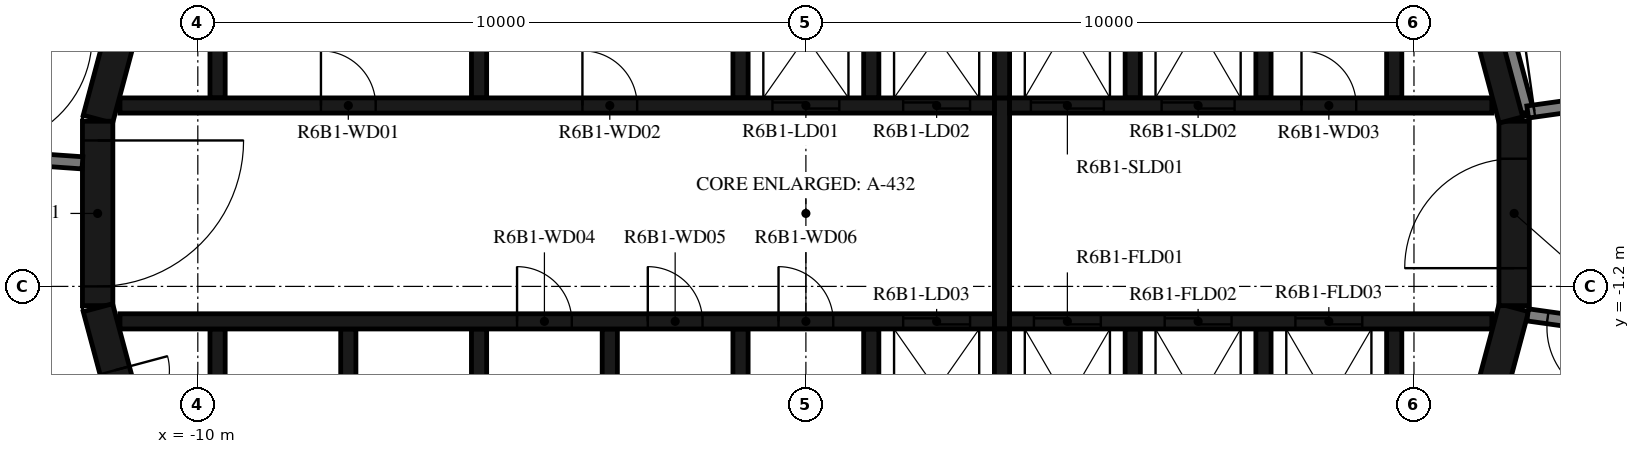
"""IFC4 building model, lengths in metres.
Left out: names, types, materials, properties, quantities, classifications, styles, units other than length and angle.
Written with IfcOpenShell. Run it as: python <this file> out.ifc"""

import sys

from ifc_helpers import new_model, si_unit, direction, frame, frame_2d, origin, place, context, subcontext, project, spatial, polyline, rectangle, outline, extrude, element, fill, save


model = new_model("IFC4")
c1 = context("Model", 3, precision=1e-05, world=origin(), true_north=direction((0.0, 1.0)))
c2 = subcontext(c1, "Body", "Model", "MODEL_VIEW")
j1 = project(units=[si_unit("LENGTHUNIT", "METRE"), si_unit("PLANEANGLEUNIT", "RADIAN")], contexts=[c1])
p1 = place(None, origin())
s1 = spatial("IfcSite", under=j1, at=p1, CompositionType="ELEMENT")
p2 = place(p1, origin())
s2 = spatial("IfcBuilding", under=s1, at=p2, CompositionType="ELEMENT")
p3 = place(p2, frame((0.0, 0.0, 237.2)))
s3 = spatial("IfcBuildingStorey", under=s2, at=p3, CompositionType="ELEMENT", Elevation=237.2)
p4 = place(p3, frame((10.858, -4.479, 0.0), z_axis=(0.0, 0.0, 1.0), x_axis=(0.258734743916, 0.965948410781, 0.0)))
e1 = element("IfcWall", 1, at=p4, inside=s3, PredefinedType="SHEAR", context=c2, shape_type="SweptSolid", body=[
    extrude(rectangle(XDim=3.033, YDim=0.5, at=frame_2d((1.516, 0.0))), origin(), (0.0, 0.0, 1.0), 3.12),
])
p5 = place(p3, frame((11.647, -1.516, 0.0), z_axis=(0.0, 0.0, 1.0), x_axis=(0.0, 1.0, 0.0)))
e2 = element("IfcWall", 2, at=p5, inside=s3, PredefinedType="SHEAR", context=c2, shape_type="SweptSolid", body=[
    extrude(rectangle(XDim=3.033, YDim=0.5, at=frame_2d((1.516, 0.0))), origin(), (0.0, 0.0, 1.0), 3.12),
])
p6 = place(p5, frame((0.616, 0.0, 0.0)))
e3 = element("IfcOpeningElement", 3, at=p6, cuts=e2, PredefinedType="OPENING", context=c2, shape_type="SweptSolid", body=[
    extrude(rectangle(XDim=1.8, YDim=2.1, at=frame_2d((0.9, 1.05))), frame((0.0, 0.26, 0.0), z_axis=(0.0, -1.0, 0.0), x_axis=(1.0, 0.0, 0.0)), (0.0, 0.0, 1.0), 0.52),
])
for number, where, z_axis, x_axis in (
    (4, (11.643, 1.55, 0.0), (0.0, 0.0, 1.0), (-0.259, 0.966, 0.0)),
    (5, (-10.858, 4.479, 0.0), (0.0, 0.0, 1.0), (-0.259, -0.966, 0.0)),
):
    element("IfcWall", number, at=place(p3, frame(where, z_axis=z_axis, x_axis=x_axis)), inside=s3, PredefinedType="SHEAR", context=c2, shape_type="SweptSolid", body=[
        extrude(rectangle(XDim=3.033, YDim=0.5, at=frame_2d((1.516, 0.0))), origin(), (0.0, 0.0, 1.0), 3.12),
    ])
p7 = place(p3, frame((-11.647, 1.516, 0.0), z_axis=(0.0, 0.0, 1.0), x_axis=(0.0, -1.0, 0.0)))
e6 = element("IfcWall", 6, at=p7, inside=s3, PredefinedType="SHEAR", context=c2, shape_type="SweptSolid", body=[
    extrude(rectangle(XDim=3.033, YDim=0.5, at=frame_2d((1.516, 0.0))), origin(), (0.0, 0.0, 1.0), 3.12),
])
p8 = place(p7, frame((0.316, 0.0, 0.0)))
e7 = element("IfcOpeningElement", 7, at=p8, cuts=e6, PredefinedType="OPENING", context=c2, shape_type="SweptSolid", body=[
    extrude(rectangle(XDim=2.4, YDim=2.1, at=frame_2d((1.2, 1.05))), frame((0.0, 0.26, 0.0), z_axis=(0.0, -1.0, 0.0), x_axis=(1.0, 0.0, 0.0)), (0.0, 0.0, 1.0), 0.52),
])
p9 = place(p3, frame((-11.643, -1.55, 0.0), z_axis=(0.0, 0.0, 1.0), x_axis=(0.258734743916, -0.965948410781, 0.0)))
e8 = element("IfcWall", 8, at=p9, inside=s3, PredefinedType="SHEAR", context=c2, shape_type="SweptSolid", body=[
    extrude(rectangle(XDim=3.033, YDim=0.5, at=frame_2d((1.516, 0.0))), origin(), (0.0, 0.0, 1.0), 3.12),
])
p10 = place(p9, frame((1.066, 0.0, 0.0)))
e9 = element("IfcOpeningElement", 9, at=p10, cuts=e8, PredefinedType="OPENING", context=c2, shape_type="SweptSolid", body=[
    extrude(rectangle(XDim=0.9, YDim=2.1, at=frame_2d((0.45, 1.05))), frame((0.0, 0.26, 0.0), z_axis=(0.0, -1.0, 0.0), x_axis=(1.0, 0.0, 0.0)), (0.0, 0.0, 1.0), 0.52),
])
p11 = place(p3, origin())
e10 = element("IfcWall", 10, at=p11, inside=s3, PredefinedType="SHEAR", context=c2, shape_type="SweptSolid", body=[
    extrude(outline(polyline([(-9.55, 4.8), (-5.5, 4.8), (-5.5, 1.9), (-5.25, 1.9), (-5.25, 4.8), (-1.2, 4.8), (-1.2, 1.9), (-0.95, 1.9), (-0.95, 4.8), (0.95, 4.8), (0.95, 1.9), (1.2, 1.9), (1.2, 4.8), (3.1, 4.8), (3.1, 1.9), (3.35, 1.9), (3.35, 4.8), (5.25, 4.8), (5.25, 1.9), (5.5, 1.9), (5.5, 4.8), (7.4, 4.8), (7.4, 1.9), (7.65, 1.9), (7.65, 4.8), (9.55, 4.8), (9.55, 1.9), (9.8, 1.9), (9.8, 4.8), (9.8, 5.05), (-9.8, 5.05), (-9.8, 4.8), (-9.8, 1.9), (-9.55, 1.9), (-9.55, 4.8)])), origin(), (0.0, 0.0, 1.0), 3.12),
])
p12 = place(p3, origin())
e11 = element("IfcWall", 11, at=p12, inside=s3, PredefinedType="SHEAR", context=c2, shape_type="SweptSolid", body=[
    extrude(outline(polyline([(9.8, -5.05), (9.8, -4.8), (9.8, -1.9), (9.55, -1.9), (9.55, -4.8), (7.65, -4.8), (7.65, -1.9), (7.4, -1.9), (7.4, -4.8), (5.5, -4.8), (5.5, -1.9), (5.25, -1.9), (5.25, -4.8), (3.35, -4.8), (3.35, -1.9), (3.1, -1.9), (3.1, -4.8), (1.2, -4.8), (1.2, -1.9), (0.95, -1.9), (0.95, -4.8), (-0.95, -4.8), (-0.95, -1.9), (-1.2, -1.9), (-1.2, -4.8), (-3.1, -4.8), (-3.1, -1.9), (-3.35, -1.9), (-3.35, -4.8), (-5.25, -4.8), (-5.25, -1.9), (-5.5, -1.9), (-5.5, -4.8), (-7.4, -4.8), (-7.4, -1.9), (-7.65, -1.9), (-7.65, -4.8), (-9.55, -4.8), (-9.55, -1.9), (-9.8, -1.9), (-9.8, -4.8), (-9.8, -5.05), (9.8, -5.05)])), origin(), (0.0, 0.0, 1.0), 3.12),
])
p13 = place(p3, frame((-11.28, 1.775, 0.0), z_axis=(0.0, 0.0, 1.0), x_axis=(1.0, 0.0, 0.0)))
e12 = element("IfcWall", 12, at=p13, inside=s3, PredefinedType="SHEAR", context=c2, shape_type="SweptSolid", body=[
    extrude(rectangle(XDim=14.38, YDim=0.25, at=frame_2d((7.19, 0.0))), origin(), (0.0, 0.0, 1.0), 3.12),
])
p14 = place(p13, frame((10.73, 0.0, 0.0)))
e13 = element("IfcOpeningElement", 13, at=p14, cuts=e12, PredefinedType="OPENING", context=c2, shape_type="SweptSolid", body=[
    extrude(rectangle(XDim=1.1, YDim=2.1, at=frame_2d((0.55, 1.05))), frame((0.0, 0.135, 0.0), z_axis=(0.0, -1.0, 0.0), x_axis=(1.0, 0.0, 0.0)), (0.0, 0.0, 1.0), 0.27),
])
p15 = place(p13, frame((12.88, 0.0, 0.0)))
e14 = element("IfcOpeningElement", 14, at=p15, cuts=e12, PredefinedType="OPENING", context=c2, shape_type="SweptSolid", body=[
    extrude(rectangle(XDim=1.1, YDim=2.1, at=frame_2d((0.55, 1.05))), frame((0.0, 0.135, 0.0), z_axis=(0.0, -1.0, 0.0), x_axis=(1.0, 0.0, 0.0)), (0.0, 0.0, 1.0), 0.27),
])
p16 = place(p13, frame((3.305, 0.0, 0.0)))
e15 = element("IfcOpeningElement", 15, at=p16, cuts=e12, PredefinedType="OPENING", context=c2, shape_type="SweptSolid", body=[
    extrude(rectangle(XDim=0.9, YDim=2.1, at=frame_2d((0.45, 1.05))), frame((0.0, 0.135, 0.0), z_axis=(0.0, -1.0, 0.0), x_axis=(1.0, 0.0, 0.0)), (0.0, 0.0, 1.0), 0.27),
])
p17 = place(p13, frame((7.605, 0.0, 0.0)))
e16 = element("IfcOpeningElement", 16, at=p17, cuts=e12, PredefinedType="OPENING", context=c2, shape_type="SweptSolid", body=[
    extrude(rectangle(XDim=0.9, YDim=2.1, at=frame_2d((0.45, 1.05))), frame((0.0, 0.135, 0.0), z_axis=(0.0, -1.0, 0.0), x_axis=(1.0, 0.0, 0.0)), (0.0, 0.0, 1.0), 0.27),
])
p18 = place(p3, frame((3.35, 1.775, 0.0), z_axis=(0.0, 0.0, 1.0), x_axis=(1.0, 0.0, 0.0)))
e17 = element("IfcWall", 17, at=p18, inside=s3, PredefinedType="SHEAR", context=c2, shape_type="SweptSolid", body=[
    extrude(rectangle(XDim=7.93, YDim=0.25, at=frame_2d((3.965, 0.0))), origin(), (0.0, 0.0, 1.0), 3.12),
])
p19 = place(p18, frame((0.35, 0.0, 0.0)))
e18 = element("IfcOpeningElement", 18, at=p19, cuts=e17, PredefinedType="OPENING", context=c2, shape_type="SweptSolid", body=[
    extrude(rectangle(XDim=1.2, YDim=2.4, at=frame_2d((0.6, 1.2))), frame((0.0, 0.135, 0.0), z_axis=(0.0, -1.0, 0.0), x_axis=(1.0, 0.0, 0.0)), (0.0, 0.0, 1.0), 0.27),
])
p20 = place(p18, frame((2.5, 0.0, 0.0)))
e19 = element("IfcOpeningElement", 19, at=p20, cuts=e17, PredefinedType="OPENING", context=c2, shape_type="SweptSolid", body=[
    extrude(rectangle(XDim=1.2, YDim=2.4, at=frame_2d((0.6, 1.2))), frame((0.0, 0.135, 0.0), z_axis=(0.0, -1.0, 0.0), x_axis=(1.0, 0.0, 0.0)), (0.0, 0.0, 1.0), 0.27),
])
p21 = place(p18, frame((4.8, 0.0, 0.0)))
e20 = element("IfcOpeningElement", 20, at=p21, cuts=e17, PredefinedType="OPENING", context=c2, shape_type="SweptSolid", body=[
    extrude(rectangle(XDim=0.9, YDim=2.1, at=frame_2d((0.45, 1.05))), frame((0.0, 0.135, 0.0), z_axis=(0.0, -1.0, 0.0), x_axis=(1.0, 0.0, 0.0)), (0.0, 0.0, 1.0), 0.27),
])
p22 = place(p3, frame((-11.28, -1.775, 0.0), z_axis=(0.0, 0.0, 1.0), x_axis=(1.0, 0.0, 0.0)))
e21 = element("IfcWall", 21, at=p22, inside=s3, PredefinedType="SHEAR", context=c2, shape_type="SweptSolid", body=[
    extrude(rectangle(XDim=14.38, YDim=0.25, at=frame_2d((7.19, 0.0))), origin(), (0.0, 0.0, 1.0), 3.12),
])
p23 = place(p22, frame((12.88, 0.0, 0.0)))
e22 = element("IfcOpeningElement", 22, at=p23, cuts=e21, PredefinedType="OPENING", context=c2, shape_type="SweptSolid", body=[
    extrude(rectangle(XDim=1.1, YDim=2.1, at=frame_2d((0.55, 1.05))), frame((0.0, 0.135, 0.0), z_axis=(0.0, -1.0, 0.0), x_axis=(1.0, 0.0, 0.0)), (0.0, 0.0, 1.0), 0.27),
])
p24 = place(p22, frame((6.53, 0.0, 0.0)))
e23 = element("IfcOpeningElement", 23, at=p24, cuts=e21, PredefinedType="OPENING", context=c2, shape_type="SweptSolid", body=[
    extrude(rectangle(XDim=0.9, YDim=2.1, at=frame_2d((0.45, 1.05))), frame((0.0, 0.135, 0.0), z_axis=(0.0, -1.0, 0.0), x_axis=(1.0, 0.0, 0.0)), (0.0, 0.0, 1.0), 0.27),
])
p25 = place(p22, frame((8.68, 0.0, 0.0)))
e24 = element("IfcOpeningElement", 24, at=p25, cuts=e21, PredefinedType="OPENING", context=c2, shape_type="SweptSolid", body=[
    extrude(rectangle(XDim=0.9, YDim=2.1, at=frame_2d((0.45, 1.05))), frame((0.0, 0.135, 0.0), z_axis=(0.0, -1.0, 0.0), x_axis=(1.0, 0.0, 0.0)), (0.0, 0.0, 1.0), 0.27),
])
p26 = place(p22, frame((10.83, 0.0, 0.0)))
e25 = element("IfcOpeningElement", 25, at=p26, cuts=e21, PredefinedType="OPENING", context=c2, shape_type="SweptSolid", body=[
    extrude(rectangle(XDim=0.9, YDim=2.1, at=frame_2d((0.45, 1.05))), frame((0.0, 0.135, 0.0), z_axis=(0.0, -1.0, 0.0), x_axis=(1.0, 0.0, 0.0)), (0.0, 0.0, 1.0), 0.27),
])
p27 = place(p3, frame((3.35, -1.775, 0.0), z_axis=(0.0, 0.0, 1.0), x_axis=(1.0, 0.0, 0.0)))
e26 = element("IfcWall", 26, at=p27, inside=s3, PredefinedType="SHEAR", context=c2, shape_type="SweptSolid", body=[
    extrude(rectangle(XDim=7.93, YDim=0.25, at=frame_2d((3.965, 0.0))), origin(), (0.0, 0.0, 1.0), 3.12),
])
p28 = place(p27, frame((0.4, 0.0, 0.0)))
e27 = element("IfcOpeningElement", 27, at=p28, cuts=e26, PredefinedType="OPENING", context=c2, shape_type="SweptSolid", body=[
    extrude(rectangle(XDim=1.1, YDim=2.4, at=frame_2d((0.55, 1.2))), frame((0.0, 0.135, 0.0), z_axis=(0.0, -1.0, 0.0), x_axis=(1.0, 0.0, 0.0)), (0.0, 0.0, 1.0), 0.27),
])
p29 = place(p27, frame((2.55, 0.0, 0.0)))
e28 = element("IfcOpeningElement", 28, at=p29, cuts=e26, PredefinedType="OPENING", context=c2, shape_type="SweptSolid", body=[
    extrude(rectangle(XDim=1.1, YDim=2.4, at=frame_2d((0.55, 1.2))), frame((0.0, 0.135, 0.0), z_axis=(0.0, -1.0, 0.0), x_axis=(1.0, 0.0, 0.0)), (0.0, 0.0, 1.0), 0.27),
])
p30 = place(p27, frame((4.7, 0.0, 0.0)))
e29 = element("IfcOpeningElement", 29, at=p30, cuts=e26, PredefinedType="OPENING", context=c2, shape_type="SweptSolid", body=[
    extrude(rectangle(XDim=1.1, YDim=2.4, at=frame_2d((0.55, 1.2))), frame((0.0, 0.135, 0.0), z_axis=(0.0, -1.0, 0.0), x_axis=(1.0, 0.0, 0.0)), (0.0, 0.0, 1.0), 0.27),
])
p31 = place(p3, frame((3.225, -1.9, 0.0), z_axis=(0.0, 0.0, 1.0), x_axis=(0.0, 1.0, 0.0)))
e30 = element("IfcWall", 30, at=p31, inside=s3, PredefinedType="SHEAR", context=c2, shape_type="SweptSolid", body=[
    extrude(rectangle(XDim=3.8, YDim=0.25, at=frame_2d((1.9, 0.0))), origin(), (0.0, 0.0, 1.0), 3.12),
])
p32 = place(p3, frame((11.87, 1.668, 0.0), z_axis=(0.0, 0.0, 1.0), x_axis=(-0.258836880648, 0.965921047093, 0.0)))
e31 = element("IfcWall", 31, at=p32, inside=s3, PredefinedType="STANDARD", context=c2, shape_type="SweptSolid", body=[
    extrude(rectangle(XDim=1.695, YDim=0.2, at=frame_2d((0.848, 0.0))), origin(), (0.0, 0.0, 1.0), 3.12),
])
p33 = place(p3, frame((11.87, 1.668, 0.0), z_axis=(0.0, 0.0, 1.0), x_axis=(0.990267985606, 0.139173692496, 0.0)))
e32 = element("IfcWall", 32, at=p33, inside=s3, PredefinedType="STANDARD", context=c2, shape_type="SweptSolid", body=[
    extrude(rectangle(XDim=1.475, YDim=0.2, at=frame_2d((0.738, 0.0))), origin(), (0.0, 0.0, 1.0), 3.12),
])
p34 = place(p33, frame((0.11, 0.0, 0.0)))
e33 = element("IfcOpeningElement", 33, at=p34, cuts=e32, PredefinedType="OPENING", context=c2, shape_type="SweptSolid", body=[
    extrude(rectangle(XDim=1.2, YDim=2.1, at=frame_2d((0.6, 1.05))), frame((0.0, 0.11, 0.0), z_axis=(0.0, -1.0, 0.0), x_axis=(1.0, 0.0, 0.0)), (0.0, 0.0, 1.0), 0.22),
])
p35 = place(p3, frame((-13.454, 0.941, 0.0), z_axis=(0.0, 0.0, 1.0), x_axis=(0.99755155062, -0.069934997354, 0.0)))
e34 = element("IfcWall", 34, at=p35, inside=s3, PredefinedType="STANDARD", context=c2, shape_type="SweptSolid", body=[
    extrude(rectangle(XDim=1.561, YDim=0.2, at=frame_2d((0.78, 0.0))), origin(), (0.0, 0.0, 1.0), 3.12),
])
p36 = place(p3, frame((13.496, -1.897, 0.0), z_axis=(0.0, 0.0, 1.0), x_axis=(-0.99026234641, 0.139213811391, 0.0)))
e35 = element("IfcWall", 35, at=p36, inside=s3, PredefinedType="STANDARD", context=c2, shape_type="SweptSolid", body=[
    extrude(rectangle(XDim=1.641, YDim=0.2, at=frame_2d((0.821, 0.0))), origin(), (0.0, 0.0, 1.0), 3.12),
])
p37 = place(p36, frame((0.11, 0.0, 0.0)))
e36 = element("IfcOpeningElement", 36, at=p37, cuts=e35, PredefinedType="OPENING", context=c2, shape_type="SweptSolid", body=[
    extrude(rectangle(XDim=1.2, YDim=2.1, at=frame_2d((0.6, 1.05))), frame((0.0, 0.11, 0.0), z_axis=(0.0, -1.0, 0.0), x_axis=(1.0, 0.0, 0.0)), (0.0, 0.0, 1.0), 0.22),
])
p38 = place(p8, origin())
e37 = element("IfcDoor", 37, at=p38, inside=s3, OperationType="DOUBLE_DOOR_SINGLE_SWING", PredefinedType="DOOR", context=c2, shape_type="SweptSolid", body=[
    extrude(rectangle(XDim=2.4, YDim=2.1, at=frame_2d((1.2, 1.05))), frame((0.0, 0.025, 0.0), z_axis=(0.0, -1.0, 0.0), x_axis=(1.0, 0.0, 0.0)), (0.0, 0.0, 1.0), 0.05),
])
fill(e7, e37)
p39 = place(p6, origin())
e38 = element("IfcDoor", 38, at=p39, inside=s3, OperationType="DOUBLE_DOOR_SINGLE_SWING", PredefinedType="DOOR", context=c2, shape_type="SweptSolid", body=[
    extrude(rectangle(XDim=1.8, YDim=2.1, at=frame_2d((0.9, 1.05))), frame((0.0, 0.025, 0.0), z_axis=(0.0, -1.0, 0.0), x_axis=(1.0, 0.0, 0.0)), (0.0, 0.0, 1.0), 0.05),
])
fill(e3, e38)
p40 = place(p14, origin())
e39 = element("IfcDoor", 39, at=p40, inside=s3, OperationType="DOUBLE_DOOR_SLIDING", PredefinedType="DOOR", context=c2, shape_type="SweptSolid", body=[
    extrude(rectangle(XDim=1.1, YDim=2.1, at=frame_2d((0.55, 1.05))), frame((0.0, 0.025, 0.0), z_axis=(0.0, -1.0, 0.0), x_axis=(1.0, 0.0, 0.0)), (0.0, 0.0, 1.0), 0.05),
])
fill(e13, e39)
p41 = place(p15, origin())
e40 = element("IfcDoor", 40, at=p41, inside=s3, OperationType="DOUBLE_DOOR_SLIDING", PredefinedType="DOOR", context=c2, shape_type="SweptSolid", body=[
    extrude(rectangle(XDim=1.1, YDim=2.1, at=frame_2d((0.55, 1.05))), frame((0.0, 0.025, 0.0), z_axis=(0.0, -1.0, 0.0), x_axis=(1.0, 0.0, 0.0)), (0.0, 0.0, 1.0), 0.05),
])
fill(e14, e40)
p42 = place(p19, origin())
e41 = element("IfcDoor", 41, at=p42, inside=s3, OperationType="DOUBLE_DOOR_SLIDING", PredefinedType="DOOR", context=c2, shape_type="SweptSolid", body=[
    extrude(rectangle(XDim=1.2, YDim=2.4, at=frame_2d((0.6, 1.2))), frame((0.0, 0.025, 0.0), z_axis=(0.0, -1.0, 0.0), x_axis=(1.0, 0.0, 0.0)), (0.0, 0.0, 1.0), 0.05),
])
fill(e18, e41)
p43 = place(p20, origin())
e42 = element("IfcDoor", 42, at=p43, inside=s3, OperationType="DOUBLE_DOOR_SLIDING", PredefinedType="DOOR", context=c2, shape_type="SweptSolid", body=[
    extrude(rectangle(XDim=1.2, YDim=2.4, at=frame_2d((0.6, 1.2))), frame((0.0, 0.025, 0.0), z_axis=(0.0, -1.0, 0.0), x_axis=(1.0, 0.0, 0.0)), (0.0, 0.0, 1.0), 0.05),
])
fill(e19, e42)
p44 = place(p23, origin())
e43 = element("IfcDoor", 43, at=p44, inside=s3, OperationType="DOUBLE_DOOR_SLIDING", PredefinedType="DOOR", context=c2, shape_type="SweptSolid", body=[
    extrude(rectangle(XDim=1.1, YDim=2.1, at=frame_2d((0.55, 1.05))), frame((0.0, 0.025, 0.0), z_axis=(0.0, -1.0, 0.0), x_axis=(1.0, 0.0, 0.0)), (0.0, 0.0, 1.0), 0.05),
])
fill(e22, e43)
p45 = place(p28, origin())
e44 = element("IfcDoor", 44, at=p45, inside=s3, OperationType="DOUBLE_DOOR_SLIDING", PredefinedType="DOOR", context=c2, shape_type="SweptSolid", body=[
    extrude(rectangle(XDim=1.1, YDim=2.4, at=frame_2d((0.55, 1.2))), frame((0.0, 0.025, 0.0), z_axis=(0.0, -1.0, 0.0), x_axis=(1.0, 0.0, 0.0)), (0.0, 0.0, 1.0), 0.05),
])
fill(e27, e44)
p46 = place(p29, origin())
e45 = element("IfcDoor", 45, at=p46, inside=s3, OperationType="DOUBLE_DOOR_SLIDING", PredefinedType="DOOR", context=c2, shape_type="SweptSolid", body=[
    extrude(rectangle(XDim=1.1, YDim=2.4, at=frame_2d((0.55, 1.2))), frame((0.0, 0.025, 0.0), z_axis=(0.0, -1.0, 0.0), x_axis=(1.0, 0.0, 0.0)), (0.0, 0.0, 1.0), 0.05),
])
fill(e28, e45)
p47 = place(p30, origin())
e46 = element("IfcDoor", 46, at=p47, inside=s3, OperationType="DOUBLE_DOOR_SLIDING", PredefinedType="DOOR", context=c2, shape_type="SweptSolid", body=[
    extrude(rectangle(XDim=1.1, YDim=2.4, at=frame_2d((0.55, 1.2))), frame((0.0, 0.025, 0.0), z_axis=(0.0, -1.0, 0.0), x_axis=(1.0, 0.0, 0.0)), (0.0, 0.0, 1.0), 0.05),
])
fill(e29, e46)
p48 = place(p16, origin())
e47 = element("IfcDoor", 47, at=p48, inside=s3, OperationType="SINGLE_SWING_LEFT", PredefinedType="DOOR", context=c2, shape_type="SweptSolid", body=[
    extrude(rectangle(XDim=0.9, YDim=2.1, at=frame_2d((0.45, 1.05))), frame((0.0, 0.025, 0.0), z_axis=(0.0, -1.0, 0.0), x_axis=(1.0, 0.0, 0.0)), (0.0, 0.0, 1.0), 0.05),
])
fill(e15, e47)
p49 = place(p17, origin())
e48 = element("IfcDoor", 48, at=p49, inside=s3, OperationType="SINGLE_SWING_RIGHT", PredefinedType="DOOR", context=c2, shape_type="SweptSolid", body=[
    extrude(rectangle(XDim=0.9, YDim=2.1, at=frame_2d((0.45, 1.05))), frame((0.0, 0.025, 0.0), z_axis=(0.0, -1.0, 0.0), x_axis=(1.0, 0.0, 0.0)), (0.0, 0.0, 1.0), 0.05),
])
fill(e16, e48)
p50 = place(p21, origin())
e49 = element("IfcDoor", 49, at=p50, inside=s3, OperationType="SINGLE_SWING_LEFT", PredefinedType="DOOR", context=c2, shape_type="SweptSolid", body=[
    extrude(rectangle(XDim=0.9, YDim=2.1, at=frame_2d((0.45, 1.05))), frame((0.0, 0.025, 0.0), z_axis=(0.0, -1.0, 0.0), x_axis=(1.0, 0.0, 0.0)), (0.0, 0.0, 1.0), 0.05),
])
fill(e20, e49)
p51 = place(p24, origin())
e50 = element("IfcDoor", 50, at=p51, inside=s3, OperationType="SINGLE_SWING_RIGHT", PredefinedType="DOOR", context=c2, shape_type="SweptSolid", body=[
    extrude(rectangle(XDim=0.9, YDim=2.1, at=frame_2d((0.45, 1.05))), frame((0.0, 0.025, 0.0), z_axis=(0.0, -1.0, 0.0), x_axis=(1.0, 0.0, 0.0)), (0.0, 0.0, 1.0), 0.05),
])
fill(e23, e50)
p52 = place(p25, origin())
e51 = element("IfcDoor", 51, at=p52, inside=s3, OperationType="SINGLE_SWING_LEFT", PredefinedType="DOOR", context=c2, shape_type="SweptSolid", body=[
    extrude(rectangle(XDim=0.9, YDim=2.1, at=frame_2d((0.45, 1.05))), frame((0.0, 0.025, 0.0), z_axis=(0.0, -1.0, 0.0), x_axis=(1.0, 0.0, 0.0)), (0.0, 0.0, 1.0), 0.05),
])
fill(e24, e51)
p53 = place(p26, origin())
e52 = element("IfcDoor", 52, at=p53, inside=s3, OperationType="SINGLE_SWING_RIGHT", PredefinedType="DOOR", context=c2, shape_type="SweptSolid", body=[
    extrude(rectangle(XDim=0.9, YDim=2.1, at=frame_2d((0.45, 1.05))), frame((0.0, 0.025, 0.0), z_axis=(0.0, -1.0, 0.0), x_axis=(1.0, 0.0, 0.0)), (0.0, 0.0, 1.0), 0.05),
])
fill(e25, e52)
p54 = place(p10, origin())
e53 = element("IfcDoor", 53, at=p54, inside=s3, OperationType="SINGLE_SWING_LEFT", PredefinedType="DOOR", context=c2, shape_type="SweptSolid", body=[
    extrude(rectangle(XDim=0.9, YDim=2.1, at=frame_2d((0.45, 1.05))), frame((0.0, 0.025, 0.0), z_axis=(0.0, -1.0, 0.0), x_axis=(1.0, 0.0, 0.0)), (0.0, 0.0, 1.0), 0.05),
])
fill(e9, e53)
p55 = place(p34, origin())
e54 = element("IfcDoor", 54, at=p55, inside=s3, OperationType="DOUBLE_DOOR_SINGLE_SWING", PredefinedType="DOOR", context=c2, shape_type="SweptSolid", body=[
    extrude(rectangle(XDim=1.2, YDim=2.1, at=frame_2d((0.6, 1.05))), frame((0.0, 0.025, 0.0), z_axis=(0.0, -1.0, 0.0), x_axis=(1.0, 0.0, 0.0)), (0.0, 0.0, 1.0), 0.05),
])
fill(e33, e54)
p56 = place(p37, origin())
e55 = element("IfcDoor", 55, at=p56, inside=s3, OperationType="DOUBLE_DOOR_SINGLE_SWING", PredefinedType="DOOR", context=c2, shape_type="SweptSolid", body=[
    extrude(rectangle(XDim=1.2, YDim=2.1, at=frame_2d((0.6, 1.05))), frame((0.0, 0.025, 0.0), z_axis=(0.0, -1.0, 0.0), x_axis=(1.0, 0.0, 0.0)), (0.0, 0.0, 1.0), 0.05),
])
fill(e36, e55)
save(model, sys.argv[1])
